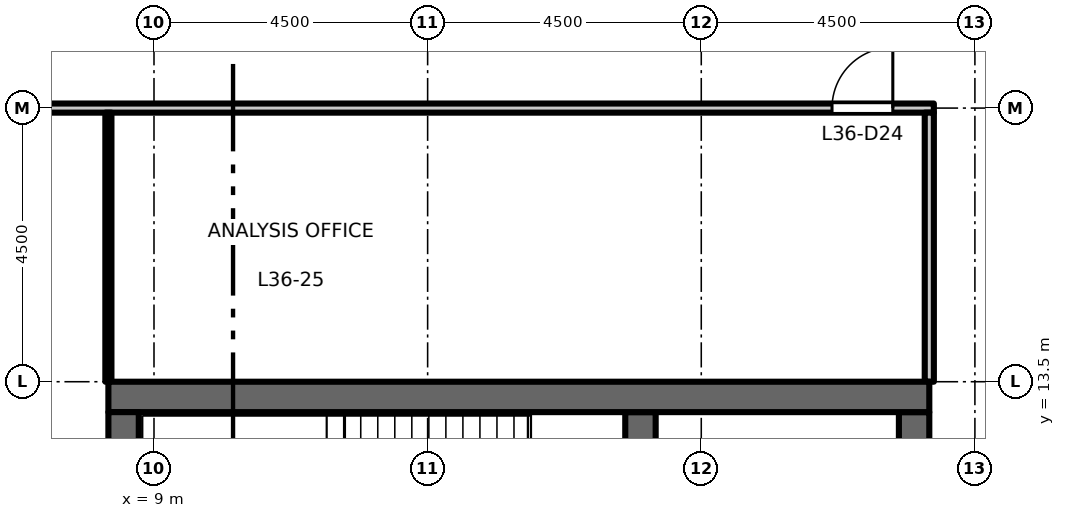
"""IFC4 building model, lengths in metres.
Left out: names, types, materials, properties, quantities, classifications, styles, units other than length and angle.
Written with IfcOpenShell. Run it as: python <this file> out.ifc"""

import sys

from ifc_helpers import new_model, si_unit, direction, frame, frame_2d, origin, place, context, subcontext, project, spatial, rectangle, extrude, element, fill, save


model = new_model("IFC4")
c1 = context("Model", 3, precision=1e-05, world=origin(), true_north=direction((0.0, 1.0)))
c2 = subcontext(c1, "Body", "Model", "MODEL_VIEW")
j1 = project(units=[si_unit("LENGTHUNIT", "METRE"), si_unit("PLANEANGLEUNIT", "RADIAN")], contexts=[c1])
p1 = place(None, origin())
s1 = spatial("IfcSite", under=j1, at=p1, CompositionType="ELEMENT")
p2 = place(p1, origin())
s2 = spatial("IfcBuilding", under=s1, at=p2, CompositionType="ELEMENT")
p3 = place(p2, frame((0.0, 0.0, 167.7)))
s3 = spatial("IfcBuildingStorey", under=s2, at=p3, CompositionType="ELEMENT", Elevation=167.7)
p4 = place(p3, frame((21.5, -13.0, 0.0), z_axis=(0.0, 0.0, 1.0), x_axis=(0.0, 1.0, 0.0)))
e1 = element("IfcWall", 1, at=p4, inside=s3, PredefinedType="SHEAR", context=c2, shape_type="SweptSolid", body=[
    extrude(rectangle(XDim=26.0, YDim=0.5, at=frame_2d((13.0, 0.0))), origin(), (0.0, 0.0, 1.0), 4.35),
])
p5 = place(p4, frame((16.825, 0.0, 0.0)))
e2 = element("IfcOpeningElement", 2, at=p5, cuts=e1, PredefinedType="OPENING", context=c2, shape_type="SweptSolid", body=[
    extrude(rectangle(XDim=1.8, YDim=2.1, at=frame_2d((0.9, 1.05))), frame((0.0, 0.26, 0.0), z_axis=(0.0, -1.0, 0.0), x_axis=(1.0, 0.0, 0.0)), (0.0, 0.0, 1.0), 0.52),
])
p6 = place(p4, frame((7.375, 0.0, 0.0)))
e3 = element("IfcOpeningElement", 3, at=p6, cuts=e1, PredefinedType="OPENING", context=c2, shape_type="SweptSolid", body=[
    extrude(rectangle(XDim=1.8, YDim=2.1, at=frame_2d((0.9, 1.05))), frame((0.0, 0.26, 0.0), z_axis=(0.0, -1.0, 0.0), x_axis=(1.0, 0.0, 0.0)), (0.0, 0.0, 1.0), 0.52),
])
p7 = place(p4, frame((22.45, 0.0, 0.0)))
e4 = element("IfcOpeningElement", 4, at=p7, cuts=e1, PredefinedType="OPENING", context=c2, shape_type="SweptSolid", body=[
    extrude(rectangle(XDim=0.9, YDim=2.1, at=frame_2d((0.45, 1.05))), frame((0.0, 0.26, 0.0), z_axis=(0.0, -1.0, 0.0), x_axis=(1.0, 0.0, 0.0)), (0.0, 0.0, 1.0), 0.52),
])
p8 = place(p4, frame((1.7, 0.0, 0.0)))
e5 = element("IfcOpeningElement", 5, at=p8, cuts=e1, PredefinedType="OPENING", context=c2, shape_type="SweptSolid", body=[
    extrude(rectangle(XDim=0.9, YDim=2.1, at=frame_2d((0.45, 1.05))), frame((0.0, 0.26, 0.0), z_axis=(0.0, -1.0, 0.0), x_axis=(1.0, 0.0, 0.0)), (0.0, 0.0, 1.0), 0.52),
])
p9 = place(p3, frame((17.0, 6.425, 0.0), z_axis=(0.0, 0.0, 1.0), x_axis=(0.0, 1.0, 0.0)))
e6 = element("IfcWall", 6, at=p9, inside=s3, PredefinedType="SHEAR", context=c2, shape_type="SweptSolid", body=[
    extrude(rectangle(XDim=6.575, YDim=0.5, at=frame_2d((3.288, 0.0))), origin(), (0.0, 0.0, 1.0), 4.35),
])
p10 = place(p3, frame((8.25, 13.25, 0.0), z_axis=(0.0, 0.0, 1.0), x_axis=(1.0, 0.0, 0.0)))
e7 = element("IfcWall", 7, at=p10, inside=s3, PredefinedType="SHEAR", context=c2, shape_type="SweptSolid", body=[
    extrude(rectangle(XDim=13.5, YDim=0.5, at=frame_2d((6.75, 0.0))), origin(), (0.0, 0.0, 1.0), 4.35),
])
p11 = place(p3, frame((8.5, -13.0, 0.0), z_axis=(0.0, 0.0, 1.0), x_axis=(0.0, 1.0, 0.0)))
e8 = element("IfcWall", 8, at=p11, inside=s3, PredefinedType="SHEAR", context=c2, shape_type="SweptSolid", body=[
    extrude(rectangle(XDim=26.0, YDim=0.5, at=frame_2d((13.0, 0.0))), origin(), (0.0, 0.0, 1.0), 4.35),
])
p12 = place(p3, frame((0.0, 18.0, 0.0), z_axis=(0.0, 0.0, 1.0), x_axis=(1.0, 0.0, 0.0)))
e9 = element("IfcWall", 9, at=p12, inside=s3, PredefinedType="PARTITIONING", context=c2, shape_type="SweptSolid", body=[
    extrude(rectangle(XDim=21.825, YDim=0.15, at=frame_2d((10.913, 0.0))), origin(), (0.0, 0.0, 1.0), 4.35),
])
p13 = place(p12, frame((0.65, 0.0, 0.0)))
e10 = element("IfcOpeningElement", 10, at=p13, cuts=e9, PredefinedType="OPENING", context=c2, shape_type="SweptSolid", body=[
    extrude(rectangle(XDim=1.0, YDim=2.1, at=frame_2d((0.5, 1.05))), frame((0.0, 0.085, 0.0), z_axis=(0.0, -1.0, 0.0), x_axis=(1.0, 0.0, 0.0)), (0.0, 0.0, 1.0), 0.17),
])
p14 = place(p12, frame((20.15, 0.0, 0.0)))
e11 = element("IfcOpeningElement", 11, at=p14, cuts=e9, PredefinedType="OPENING", context=c2, shape_type="SweptSolid", body=[
    extrude(rectangle(XDim=1.0, YDim=2.1, at=frame_2d((0.5, 1.05))), frame((0.0, 0.085, 0.0), z_axis=(0.0, -1.0, 0.0), x_axis=(1.0, 0.0, 0.0)), (0.0, 0.0, 1.0), 0.17),
])
p15 = place(p3, frame((8.25, 13.5, 0.0), z_axis=(0.0, 0.0, 1.0), x_axis=(0.0, 1.0, 0.0)))
e12 = element("IfcWall", 12, at=p15, inside=s3, PredefinedType="PARTITIONING", context=c2, shape_type="SweptSolid", body=[
    extrude(rectangle(XDim=4.425, YDim=0.1, at=frame_2d((2.212, 0.0))), origin(), (0.0, 0.0, 1.0), 4.35),
])
p16 = place(p3, frame((21.75, 13.5, 0.0), z_axis=(0.0, 0.0, 1.0), x_axis=(0.0, 1.0, 0.0)))
e13 = element("IfcWall", 13, at=p16, inside=s3, PredefinedType="PARTITIONING", context=c2, shape_type="SweptSolid", body=[
    extrude(rectangle(XDim=4.425, YDim=0.15, at=frame_2d((2.212, 0.0))), origin(), (0.0, 0.0, 1.0), 4.35),
])
p17 = place(p14, origin())
e14 = element("IfcDoor", 14, at=p17, inside=s3, OperationType="SINGLE_SWING_RIGHT", PredefinedType="DOOR", context=c2, shape_type="SweptSolid", body=[
    extrude(rectangle(XDim=1.0, YDim=2.1, at=frame_2d((0.5, 1.05))), frame((0.0, 0.025, 0.0), z_axis=(0.0, -1.0, 0.0), x_axis=(1.0, 0.0, 0.0)), (0.0, 0.0, 1.0), 0.05),
])
fill(e11, e14)
save(model, sys.argv[1])
